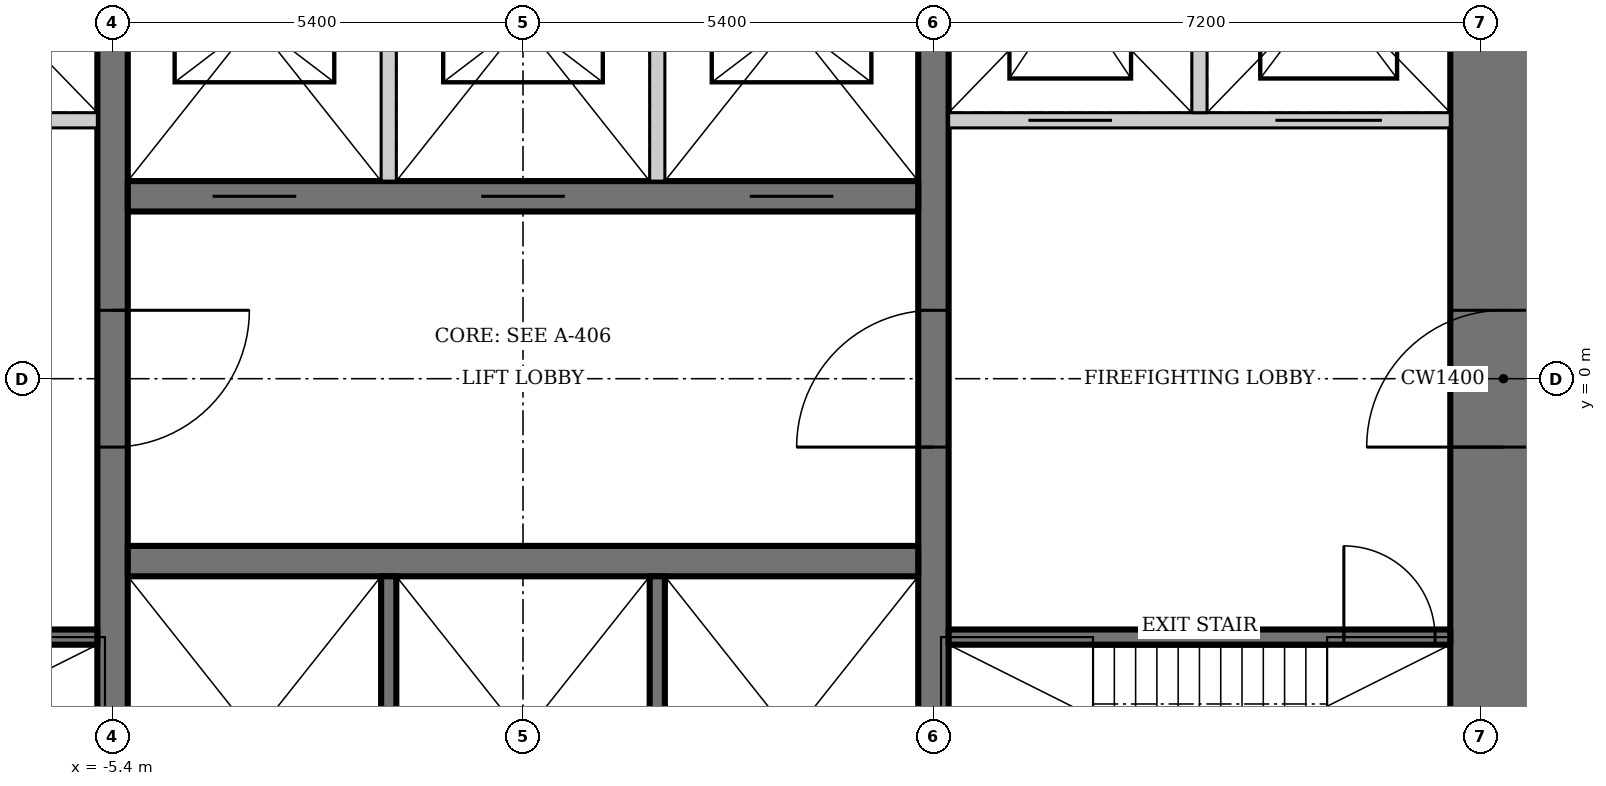
"""IFC4 building model, lengths in metres.
Left out: names, types, materials, properties, quantities, classifications, styles, units other than length and angle.
Written with IfcOpenShell. Run it as: python <this file> out.ifc"""

import sys

from ifc_helpers import new_model, si_unit, direction, frame, frame_2d, origin, place, context, subcontext, project, spatial, rectangle, extrude, element, fill, save


model = new_model("IFC4")
c1 = context("Model", 3, precision=1e-05, world=origin(), true_north=direction((0.0, 1.0)))
c2 = subcontext(c1, "Body", "Model", "MODEL_VIEW")
j1 = project(units=[si_unit("LENGTHUNIT", "METRE"), si_unit("PLANEANGLEUNIT", "RADIAN")], contexts=[c1])
p1 = place(None, origin())
s1 = spatial("IfcSite", under=j1, at=p1, CompositionType="ELEMENT")
p2 = place(p1, origin())
s2 = spatial("IfcBuilding", under=s1, at=p2, CompositionType="ELEMENT")
p3 = place(p2, frame((0.0, 0.0, 117.4)))
s3 = spatial("IfcBuildingStorey", under=s2, at=p3, CompositionType="ELEMENT", Elevation=117.4)
p4 = place(p3, frame((12.9, -13.0, 0.0), z_axis=(0.0, 0.0, 1.0), x_axis=(0.0, 1.0, 0.0)))
e1 = element("IfcWall", 1, at=p4, inside=s3, PredefinedType="SHEAR", context=c2, shape_type="SweptSolid", body=[
    extrude(rectangle(XDim=26.0, YDim=1.4, at=frame_2d((13.0, 0.0))), origin(), (0.0, 0.0, 1.0), 4.2),
])
p5 = place(p4, frame((12.1, 0.0, 0.0)))
e2 = element("IfcOpeningElement", 2, at=p5, cuts=e1, PredefinedType="OPENING", context=c2, shape_type="SweptSolid", body=[
    extrude(rectangle(XDim=1.8, YDim=2.1, at=frame_2d((0.9, 1.05))), frame((0.0, 0.71, 0.0), z_axis=(0.0, -1.0, 0.0), x_axis=(1.0, 0.0, 0.0)), (0.0, 0.0, 1.0), 1.42),
])
p6 = place(p3, frame((5.4, -6.8, 0.0), z_axis=(0.0, 0.0, 1.0), x_axis=(0.0, 1.0, 0.0)))
e3 = element("IfcWall", 3, at=p6, inside=s3, PredefinedType="SHEAR", context=c2, shape_type="SweptSolid", body=[
    extrude(rectangle(XDim=13.6, YDim=0.4, at=frame_2d((6.8, 0.0))), origin(), (0.0, 0.0, 1.0), 4.2),
])
p7 = place(p6, frame((5.9, 0.0, 0.0)))
e4 = element("IfcOpeningElement", 4, at=p7, cuts=e3, PredefinedType="OPENING", context=c2, shape_type="SweptSolid", body=[
    extrude(rectangle(XDim=1.8, YDim=2.1, at=frame_2d((0.9, 1.05))), frame((0.0, 0.21, 0.0), z_axis=(0.0, -1.0, 0.0), x_axis=(1.0, 0.0, 0.0)), (0.0, 0.0, 1.0), 0.42),
])
p8 = place(p3, frame((-5.4, 6.8, 0.0), z_axis=(0.0, 0.0, 1.0), x_axis=(0.0, -1.0, 0.0)))
e5 = element("IfcWall", 5, at=p8, inside=s3, PredefinedType="SHEAR", context=c2, shape_type="SweptSolid", body=[
    extrude(rectangle(XDim=13.6, YDim=0.4, at=frame_2d((6.8, 0.0))), origin(), (0.0, 0.0, 1.0), 4.2),
])
p9 = place(p8, frame((5.9, 0.0, 0.0)))
e6 = element("IfcOpeningElement", 6, at=p9, cuts=e5, PredefinedType="OPENING", context=c2, shape_type="SweptSolid", body=[
    extrude(rectangle(XDim=1.8, YDim=2.1, at=frame_2d((0.9, 1.05))), frame((0.0, 0.21, 0.0), z_axis=(0.0, -1.0, 0.0), x_axis=(1.0, 0.0, 0.0)), (0.0, 0.0, 1.0), 0.42),
])
p10 = place(p3, frame((-5.2, -2.4, 0.0), z_axis=(0.0, 0.0, 1.0), x_axis=(1.0, 0.0, 0.0)))
e7 = element("IfcWall", 7, at=p10, inside=s3, PredefinedType="SHEAR", context=c2, shape_type="SweptSolid", body=[
    extrude(rectangle(XDim=10.4, YDim=0.4, at=frame_2d((5.2, 0.0))), origin(), (0.0, 0.0, 1.0), 4.2),
])
for number, where, z_axis, x_axis in (
    (8, (-1.767, -2.6, 0.0), (0.0, 0.0, 1.0), (0.0, -1.0, 0.0)),
    (9, (1.767, -2.6, 0.0), (0.0, 0.0, 1.0), (0.0, -1.0, 0.0)),
):
    element("IfcWall", number, at=place(p3, frame(where, z_axis=z_axis, x_axis=x_axis)), inside=s3, PredefinedType="SOLIDWALL", context=c2, shape_type="SweptSolid", body=[
        extrude(rectangle(XDim=4.2, YDim=0.2, at=frame_2d((2.1, 0.0))), origin(), (0.0, 0.0, 1.0), 4.2),
    ])
p11 = place(p3, frame((5.2, 2.4, 0.0), z_axis=(0.0, 0.0, 1.0), x_axis=(-1.0, 0.0, 0.0)))
e10 = element("IfcWall", 10, at=p11, inside=s3, PredefinedType="SHEAR", context=c2, shape_type="SweptSolid", body=[
    extrude(rectangle(XDim=10.4, YDim=0.4, at=frame_2d((5.2, 0.0))), origin(), (0.0, 0.0, 1.0), 4.2),
])
p12 = place(p11, frame((8.183, 0.0, 0.0)))
e11 = element("IfcOpeningElement", 11, at=p12, cuts=e10, PredefinedType="OPENING", context=c2, shape_type="SweptSolid", body=[
    extrude(rectangle(XDim=1.1, YDim=2.2, at=frame_2d((0.55, 1.1))), frame((0.0, 0.21, 0.0), z_axis=(0.0, -1.0, 0.0), x_axis=(1.0, 0.0, 0.0)), (0.0, 0.0, 1.0), 0.42),
])
p13 = place(p11, frame((4.65, 0.0, 0.0)))
e12 = element("IfcOpeningElement", 12, at=p13, cuts=e10, PredefinedType="OPENING", context=c2, shape_type="SweptSolid", body=[
    extrude(rectangle(XDim=1.1, YDim=2.2, at=frame_2d((0.55, 1.1))), frame((0.0, 0.21, 0.0), z_axis=(0.0, -1.0, 0.0), x_axis=(1.0, 0.0, 0.0)), (0.0, 0.0, 1.0), 0.42),
])
p14 = place(p11, frame((1.117, 0.0, 0.0)))
e13 = element("IfcOpeningElement", 13, at=p14, cuts=e10, PredefinedType="OPENING", context=c2, shape_type="SweptSolid", body=[
    extrude(rectangle(XDim=1.1, YDim=2.2, at=frame_2d((0.55, 1.1))), frame((0.0, 0.21, 0.0), z_axis=(0.0, -1.0, 0.0), x_axis=(1.0, 0.0, 0.0)), (0.0, 0.0, 1.0), 0.42),
])
for number, where, z_axis, x_axis in (
    (14, (-1.767, 2.6, 0.0), (0.0, 0.0, 1.0), (0.0, 1.0, 0.0)),
    (15, (1.767, 2.6, 0.0), (0.0, 0.0, 1.0), (0.0, 1.0, 0.0)),
):
    element("IfcWall", number, at=place(p3, frame(where, z_axis=z_axis, x_axis=x_axis)), inside=s3, PredefinedType="SOLIDWALL", context=c2, shape_type="SweptSolid", body=[
        extrude(rectangle(XDim=4.2, YDim=0.2, at=frame_2d((2.1, 0.0))), origin(), (0.0, 0.0, 1.0), 4.2),
    ])
p15 = place(p3, frame((5.6, -3.4, 0.0), z_axis=(0.0, 0.0, 1.0), x_axis=(1.0, 0.0, 0.0)))
e16 = element("IfcWall", 16, at=p15, inside=s3, PredefinedType="SHEAR", context=c2, shape_type="SweptSolid", body=[
    extrude(rectangle(XDim=6.6, YDim=0.2, at=frame_2d((3.3, 0.0))), origin(), (0.0, 0.0, 1.0), 4.2),
])
p16 = place(p15, frame((5.2, 0.0, 0.0)))
e17 = element("IfcOpeningElement", 17, at=p16, cuts=e16, PredefinedType="OPENING", context=c2, shape_type="SweptSolid", body=[
    extrude(rectangle(XDim=1.2, YDim=2.1, at=frame_2d((0.6, 1.05))), frame((0.0, 0.11, 0.0), z_axis=(0.0, -1.0, 0.0), x_axis=(1.0, 0.0, 0.0)), (0.0, 0.0, 1.0), 0.22),
])
p17 = place(p3, frame((12.2, 3.4, 0.0), z_axis=(0.0, 0.0, 1.0), x_axis=(-1.0, 0.0, 0.0)))
e18 = element("IfcWall", 18, at=p17, inside=s3, PredefinedType="SOLIDWALL", context=c2, shape_type="SweptSolid", body=[
    extrude(rectangle(XDim=6.6, YDim=0.2, at=frame_2d((3.3, 0.0))), origin(), (0.0, 0.0, 1.0), 4.2),
])
p18 = place(p17, frame((4.45, 0.0, 0.0)))
e19 = element("IfcOpeningElement", 19, at=p18, cuts=e18, PredefinedType="OPENING", context=c2, shape_type="SweptSolid", body=[
    extrude(rectangle(XDim=1.1, YDim=2.2, at=frame_2d((0.55, 1.1))), frame((0.0, 0.11, 0.0), z_axis=(0.0, -1.0, 0.0), x_axis=(1.0, 0.0, 0.0)), (0.0, 0.0, 1.0), 0.22),
])
p19 = place(p17, frame((0.9, 0.0, 0.0)))
e20 = element("IfcOpeningElement", 20, at=p19, cuts=e18, PredefinedType="OPENING", context=c2, shape_type="SweptSolid", body=[
    extrude(rectangle(XDim=1.4, YDim=2.2, at=frame_2d((0.7, 1.1))), frame((0.0, 0.11, 0.0), z_axis=(0.0, -1.0, 0.0), x_axis=(1.0, 0.0, 0.0)), (0.0, 0.0, 1.0), 0.22),
])
p20 = place(p3, frame((8.9, 3.5, 0.0), z_axis=(0.0, 0.0, 1.0), x_axis=(0.0, 1.0, 0.0)))
e21 = element("IfcWall", 21, at=p20, inside=s3, PredefinedType="SOLIDWALL", context=c2, shape_type="SweptSolid", body=[
    extrude(rectangle(XDim=3.3, YDim=0.2, at=frame_2d((1.65, 0.0))), origin(), (0.0, 0.0, 1.0), 4.2),
])
p21 = place(p3, frame((-5.6, -3.4, 0.0), z_axis=(0.0, 0.0, 1.0), x_axis=(-1.0, 0.0, 0.0)))
e22 = element("IfcWall", 22, at=p21, inside=s3, PredefinedType="SHEAR", context=c2, shape_type="SweptSolid", body=[
    extrude(rectangle(XDim=6.6, YDim=0.2, at=frame_2d((3.3, 0.0))), origin(), (0.0, 0.0, 1.0), 4.2),
])
p22 = place(p21, frame((5.2, 0.0, 0.0)))
e23 = element("IfcOpeningElement", 23, at=p22, cuts=e22, PredefinedType="OPENING", context=c2, shape_type="SweptSolid", body=[
    extrude(rectangle(XDim=1.2, YDim=2.1, at=frame_2d((0.6, 1.05))), frame((0.0, 0.11, 0.0), z_axis=(0.0, -1.0, 0.0), x_axis=(1.0, 0.0, 0.0)), (0.0, 0.0, 1.0), 0.22),
])
p23 = place(p3, frame((-12.2, 3.4, 0.0), z_axis=(0.0, 0.0, 1.0), x_axis=(1.0, 0.0, 0.0)))
e24 = element("IfcWall", 24, at=p23, inside=s3, PredefinedType="SOLIDWALL", context=c2, shape_type="SweptSolid", body=[
    extrude(rectangle(XDim=6.6, YDim=0.2, at=frame_2d((3.3, 0.0))), origin(), (0.0, 0.0, 1.0), 4.2),
])
p24 = place(p23, frame((1.05, 0.0, 0.0)))
e25 = element("IfcOpeningElement", 25, at=p24, cuts=e24, PredefinedType="OPENING", context=c2, shape_type="SweptSolid", body=[
    extrude(rectangle(XDim=1.1, YDim=2.2, at=frame_2d((0.55, 1.1))), frame((0.0, 0.11, 0.0), z_axis=(0.0, -1.0, 0.0), x_axis=(1.0, 0.0, 0.0)), (0.0, 0.0, 1.0), 0.22),
])
p25 = place(p23, frame((4.3, 0.0, 0.0)))
e26 = element("IfcOpeningElement", 26, at=p25, cuts=e24, PredefinedType="OPENING", context=c2, shape_type="SweptSolid", body=[
    extrude(rectangle(XDim=1.4, YDim=2.2, at=frame_2d((0.7, 1.1))), frame((0.0, 0.11, 0.0), z_axis=(0.0, -1.0, 0.0), x_axis=(1.0, 0.0, 0.0)), (0.0, 0.0, 1.0), 0.22),
])
p26 = place(p7, origin())
e27 = element("IfcDoor", 27, at=p26, inside=s3, OperationType="DOUBLE_DOOR_DOUBLE_SWING", PredefinedType="DOOR", context=c2, shape_type="SweptSolid", body=[
    extrude(rectangle(XDim=1.8, YDim=2.1, at=frame_2d((0.9, 1.05))), frame((0.0, 0.025, 0.0), z_axis=(0.0, -1.0, 0.0), x_axis=(1.0, 0.0, 0.0)), (0.0, 0.0, 1.0), 0.05),
])
fill(e4, e27)
p27 = place(p9, origin())
e28 = element("IfcDoor", 28, at=p27, inside=s3, OperationType="DOUBLE_DOOR_DOUBLE_SWING", PredefinedType="DOOR", context=c2, shape_type="SweptSolid", body=[
    extrude(rectangle(XDim=1.8, YDim=2.1, at=frame_2d((0.9, 1.05))), frame((0.0, 0.025, 0.0), z_axis=(0.0, -1.0, 0.0), x_axis=(1.0, 0.0, 0.0)), (0.0, 0.0, 1.0), 0.05),
])
fill(e6, e28)
p28 = place(p16, origin())
e29 = element("IfcDoor", 29, at=p28, inside=s3, OperationType="SINGLE_SWING_RIGHT", PredefinedType="DOOR", context=c2, shape_type="SweptSolid", body=[
    extrude(rectangle(XDim=1.2, YDim=2.1, at=frame_2d((0.6, 1.05))), frame((0.0, 0.025, 0.0), z_axis=(0.0, -1.0, 0.0), x_axis=(1.0, 0.0, 0.0)), (0.0, 0.0, 1.0), 0.05),
])
fill(e17, e29)
p29 = place(p5, origin())
e30 = element("IfcDoor", 30, at=p29, inside=s3, OperationType="DOUBLE_DOOR_DOUBLE_SWING", PredefinedType="DOOR", context=c2, shape_type="SweptSolid", body=[
    extrude(rectangle(XDim=1.8, YDim=2.1, at=frame_2d((0.9, 1.05))), frame((0.0, 0.025, 0.0), z_axis=(0.0, -1.0, 0.0), x_axis=(1.0, 0.0, 0.0)), (0.0, 0.0, 1.0), 0.05),
])
fill(e2, e30)
p30 = place(p12, origin())
e31 = element("IfcDoor", 31, at=p30, inside=s3, OperationType="DOUBLE_DOOR_SLIDING", PredefinedType="DOOR", context=c2, shape_type="SweptSolid", body=[
    extrude(rectangle(XDim=1.1, YDim=2.2, at=frame_2d((0.55, 1.1))), frame((0.0, 0.025, 0.0), z_axis=(0.0, -1.0, 0.0), x_axis=(1.0, 0.0, 0.0)), (0.0, 0.0, 1.0), 0.05),
])
fill(e11, e31)
p31 = place(p13, origin())
e32 = element("IfcDoor", 32, at=p31, inside=s3, OperationType="DOUBLE_DOOR_SLIDING", PredefinedType="DOOR", context=c2, shape_type="SweptSolid", body=[
    extrude(rectangle(XDim=1.1, YDim=2.2, at=frame_2d((0.55, 1.1))), frame((0.0, 0.025, 0.0), z_axis=(0.0, -1.0, 0.0), x_axis=(1.0, 0.0, 0.0)), (0.0, 0.0, 1.0), 0.05),
])
fill(e12, e32)
p32 = place(p14, origin())
e33 = element("IfcDoor", 33, at=p32, inside=s3, OperationType="DOUBLE_DOOR_SLIDING", PredefinedType="DOOR", context=c2, shape_type="SweptSolid", body=[
    extrude(rectangle(XDim=1.1, YDim=2.2, at=frame_2d((0.55, 1.1))), frame((0.0, 0.025, 0.0), z_axis=(0.0, -1.0, 0.0), x_axis=(1.0, 0.0, 0.0)), (0.0, 0.0, 1.0), 0.05),
])
fill(e13, e33)
p33 = place(p18, origin())
e34 = element("IfcDoor", 34, at=p33, inside=s3, OperationType="DOUBLE_DOOR_SLIDING", PredefinedType="DOOR", context=c2, shape_type="SweptSolid", body=[
    extrude(rectangle(XDim=1.1, YDim=2.2, at=frame_2d((0.55, 1.1))), frame((0.0, 0.025, 0.0), z_axis=(0.0, -1.0, 0.0), x_axis=(1.0, 0.0, 0.0)), (0.0, 0.0, 1.0), 0.05),
])
fill(e19, e34)
p34 = place(p19, origin())
e35 = element("IfcDoor", 35, at=p34, inside=s3, OperationType="DOUBLE_DOOR_SLIDING", PredefinedType="DOOR", context=c2, shape_type="SweptSolid", body=[
    extrude(rectangle(XDim=1.4, YDim=2.2, at=frame_2d((0.7, 1.1))), frame((0.0, 0.025, 0.0), z_axis=(0.0, -1.0, 0.0), x_axis=(1.0, 0.0, 0.0)), (0.0, 0.0, 1.0), 0.05),
])
fill(e20, e35)
save(model, sys.argv[1])
